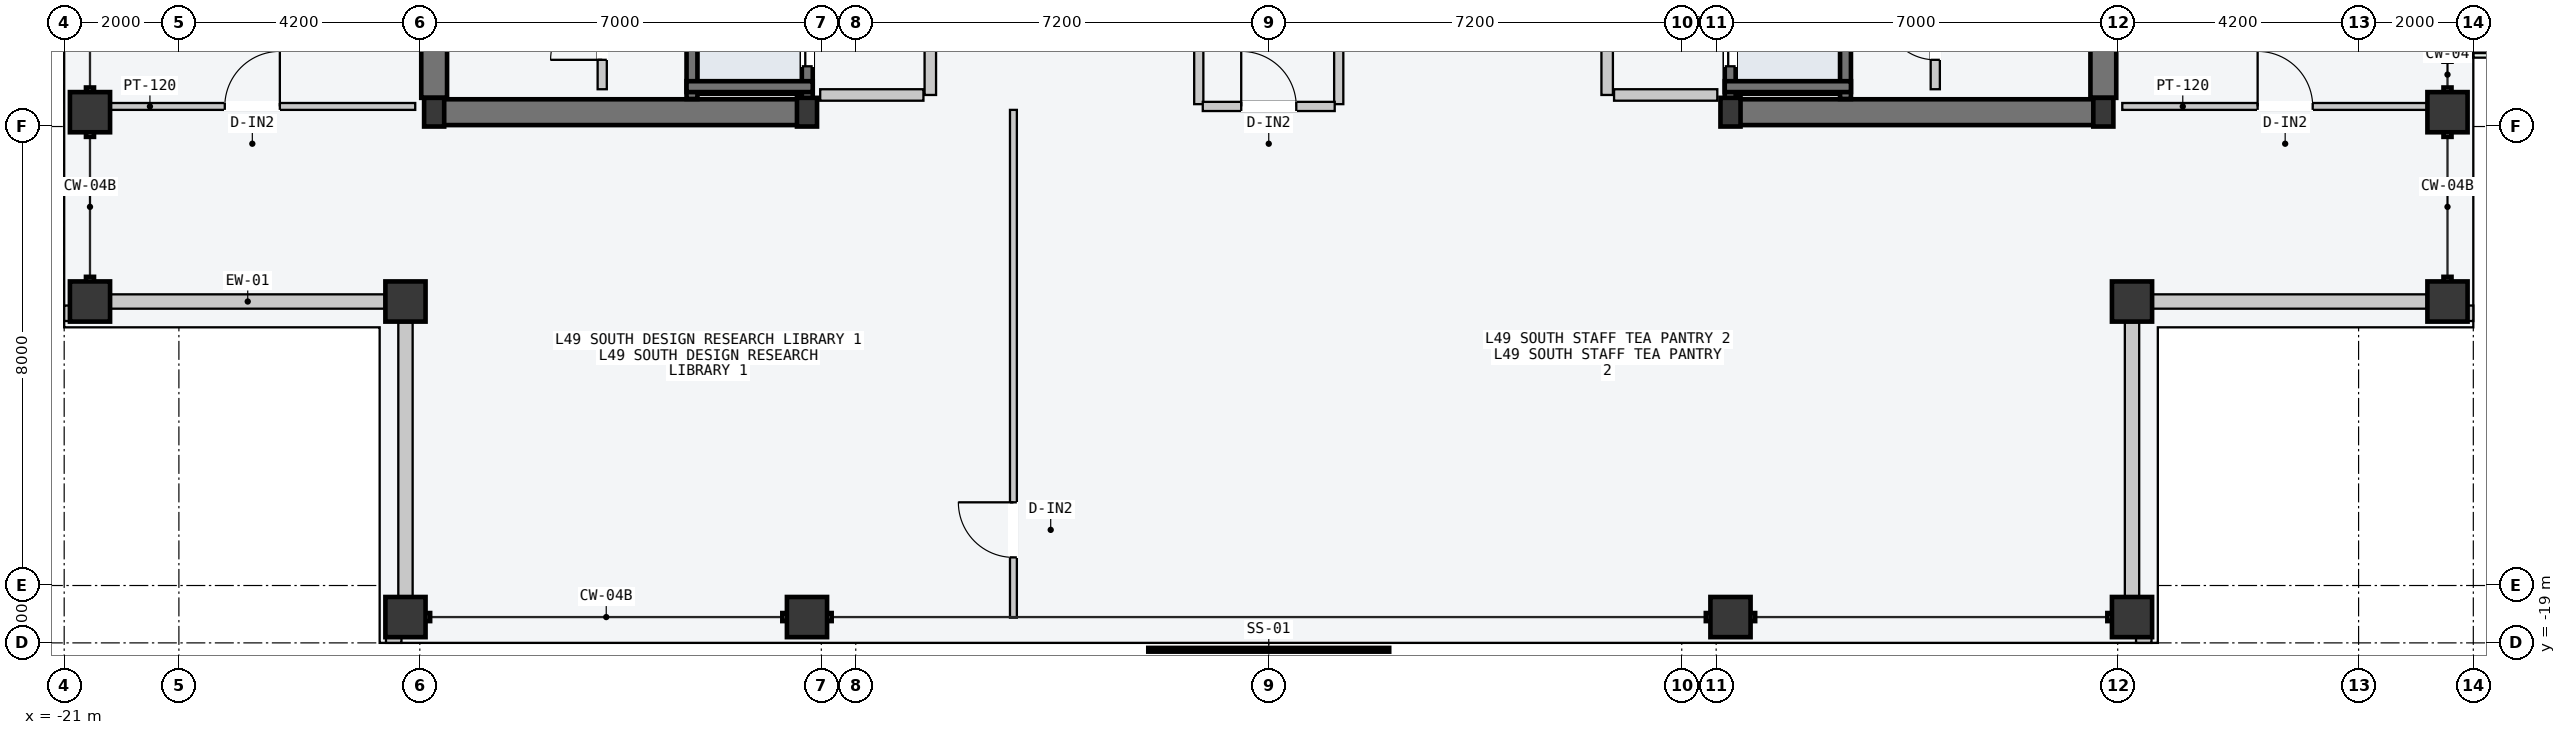
"""IFC4 building model, lengths in metres.
Left out: names, types, materials, properties, quantities, classifications, styles, units other than length and angle.
Written with IfcOpenShell. Run it as: python <this file> out.ifc"""

import sys

from ifc_helpers import new_model, si_unit, direction, frame, frame_2d, origin, origin_2d, place, context, subcontext, project, spatial, rectangle, hollow_rectangle, i_section, extrude, element, fill, save


model = new_model("IFC4")
c1 = context("Model", 3, precision=1e-05, world=origin(), true_north=direction((0.0, 1.0)))
c2 = subcontext(c1, "Body", "Model", "MODEL_VIEW")
j1 = project(units=[si_unit("LENGTHUNIT", "METRE"), si_unit("PLANEANGLEUNIT", "RADIAN")], contexts=[c1])
p1 = place(None, origin())
s1 = spatial("IfcSite", under=j1, at=p1, CompositionType="ELEMENT")
p2 = place(p1, origin())
s2 = spatial("IfcBuilding", under=s1, at=p2, CompositionType="ELEMENT")
p3 = place(p2, frame((0.0, 0.0, 187.5)))
s3 = spatial("IfcBuildingStorey", under=s2, at=p3, CompositionType="ELEMENT", Elevation=187.5)
p4 = place(p3, frame((-14.53, -9.75, -0.2), z_axis=(0.0, 0.0, 1.0), x_axis=(1.0, 0.0, 0.0)))
e1 = element("IfcWall", 1, at=p4, inside=s3, PredefinedType="SHEAR", context=c2, shape_type="SweptSolid", body=[
    extrude(rectangle(XDim=6.46, YDim=0.45, at=frame_2d((3.23, 0.0))), origin(), (0.0, 0.0, 1.0), 3.6),
])
p5 = place(p3, frame((-14.55, -9.5, -0.2), z_axis=(0.0, 0.0, 1.0), x_axis=(0.0, 1.0, 0.0)))
e2 = element("IfcWall", 2, at=p5, inside=s3, PredefinedType="SHEAR", context=c2, shape_type="SweptSolid", body=[
    extrude(rectangle(XDim=9.25, YDim=0.45, at=frame_2d((4.625, 0.0))), origin(), (0.0, 0.0, 1.0), 3.6),
])
p6 = place(p3, frame((8.07, -9.75, -0.2), z_axis=(0.0, 0.0, 1.0), x_axis=(1.0, 0.0, 0.0)))
e3 = element("IfcWall", 3, at=p6, inside=s3, PredefinedType="SHEAR", context=c2, shape_type="SweptSolid", body=[
    extrude(rectangle(XDim=6.46, YDim=0.45, at=frame_2d((3.23, 0.0))), origin(), (0.0, 0.0, 1.0), 3.6),
])
p7 = place(p3, frame((14.55, -9.5, -0.2), z_axis=(0.0, 0.0, 1.0), x_axis=(0.0, 1.0, 0.0)))
e4 = element("IfcWall", 4, at=p7, inside=s3, PredefinedType="SHEAR", context=c2, shape_type="SweptSolid", body=[
    extrude(rectangle(XDim=9.25, YDim=0.45, at=frame_2d((4.625, 0.0))), origin(), (0.0, 0.0, 1.0), 3.6),
])
for number, where, z_axis, x_axis in (
    (5, (-14.55, -9.75, 0.0), (0.0, 0.0, 1.0), (1.0, 0.0, 0.0)),
    (6, (-8.05, -9.75, 0.0), (0.0, 0.0, 1.0), (1.0, 0.0, 0.0)),
    (7, (8.05, -9.75, 0.0), (0.0, 0.0, 1.0), (1.0, 0.0, 0.0)),
    (8, (14.55, -9.75, 0.0), (0.0, 0.0, 1.0), (1.0, 0.0, 0.0)),
):
    element("IfcColumn", number, at=place(p3, frame(where, z_axis=z_axis, x_axis=x_axis)), inside=s3, PredefinedType="COLUMN", context=c2, shape_type="SweptSolid", body=[
        extrude(i_section(OverallWidth=0.35, OverallDepth=0.5, WebThickness=0.02, FlangeThickness=0.032, at=origin_2d()), origin(), (0.0, 0.0, 1.0), 3.6),
    ])
for number, where, z_axis, x_axis in (
    (9, (-15.05, -18.55, 0.0), (0.0, 0.0, 1.0), (1.0, 0.0, 0.0)),
    (10, (-8.05, -18.55, 0.0), (0.0, 0.0, 1.0), (1.0, 0.0, 0.0)),
    (11, (8.05, -18.55, 0.0), (0.0, 0.0, 1.0), (1.0, 0.0, 0.0)),
    (12, (15.05, -18.55, 0.0), (0.0, 0.0, 1.0), (1.0, 0.0, 0.0)),
    (13, (-20.55, -13.05, 0.0), (0.0, 0.0, 1.0), (0.0, 1.0, 0.0)),
    (14, (-20.55, -9.75, 0.0), (0.0, 0.0, 1.0), (0.0, 1.0, 0.0)),
    (15, (20.55, -13.05, 0.0), (0.0, 0.0, 1.0), (0.0, 1.0, 0.0)),
    (16, (20.55, -9.75, 0.0), (0.0, 0.0, 1.0), (0.0, 1.0, 0.0)),
    (17, (15.05, -13.05, 0.0), (0.0, 0.0, 1.0), (1.0, 0.0, 0.0)),
    (18, (-15.05, -13.05, 0.0), (0.0, 0.0, 1.0), (1.0, 0.0, 0.0)),
):
    element("IfcColumn", number, at=place(p3, frame(where, z_axis=z_axis, x_axis=x_axis)), inside=s3, PredefinedType="COLUMN", context=c2, shape_type="SweptSolid", body=[
        extrude(hollow_rectangle(XDim=0.7, YDim=0.7, WallThickness=0.03, at=origin_2d()), origin(), (0.0, 0.0, 1.0), 3.6),
    ])
p8 = place(p3, frame((20.86, -8.8, 0.0), z_axis=(0.0, 0.0, 1.0), x_axis=(0.0, 1.0, 0.0)))
e19 = element("IfcWall", 19, at=p8, inside=s3, PredefinedType="STANDARD", context=c2, shape_type="SweptSolid", body=[
    extrude(rectangle(XDim=10.8, YDim=0.25, at=frame_2d((5.4, 0.0))), origin(), (0.0, 0.0, 1.0), 3.4),
])
p9 = place(p8, frame((6.4, 0.0, 0.0)))
e20 = element("IfcOpeningElement", 20, at=p9, cuts=e19, PredefinedType="OPENING", context=c2, shape_type="SweptSolid", body=[
    extrude(rectangle(XDim=1.6, YDim=2.2, at=frame_2d((0.8, 1.1))), frame((0.0, 0.135, 0.0), z_axis=(0.0, -1.0, 0.0), x_axis=(1.0, 0.0, 0.0)), (0.0, 0.0, 1.0), 0.27),
])
p10 = place(p8, frame((2.0, 0.0, 0.85)))
e21 = element("IfcOpeningElement", 21, at=p10, cuts=e19, PredefinedType="OPENING", context=c2, shape_type="SweptSolid", body=[
    extrude(rectangle(XDim=2.0, YDim=2.1, at=frame_2d((1.0, 1.05))), frame((0.0, 0.135, 0.0), z_axis=(0.0, -1.0, 0.0), x_axis=(1.0, 0.0, 0.0)), (0.0, 0.0, 1.0), 0.27),
])
for number, where, z_axis, x_axis in (
    (22, (-20.19, -13.05, 0.0), (0.0, 0.0, 1.0), (1.0, 0.0, 0.0)),
    (23, (-15.05, -18.19, 0.0), (0.0, 0.0, 1.0), (0.0, 1.0, 0.0)),
    (24, (15.41, -13.05, 0.0), (0.0, 0.0, 1.0), (1.0, 0.0, 0.0)),
    (25, (15.05, -18.19, 0.0), (0.0, 0.0, 1.0), (0.0, 1.0, 0.0)),
):
    element("IfcWall", number, at=place(p3, frame(where, z_axis=z_axis, x_axis=x_axis)), inside=s3, PredefinedType="STANDARD", context=c2, shape_type="SweptSolid", body=[
        extrude(rectangle(XDim=4.78, YDim=0.25, at=frame_2d((2.39, 0.0))), origin(), (0.0, 0.0, 1.0), 2.75),
    ])
for number, where, z_axis, x_axis in (
    (26, (-15.39, -18.89, 0.0), (0.0, 0.0, 1.0), (1.0, 0.0, 0.0)),
    (27, (-20.89, -13.39, 0.0), (0.0, 0.0, 1.0), (0.0, 1.0, 0.0)),
    (28, (15.12, -18.89, 0.0), (0.0, 0.0, 1.0), (1.0, 0.0, 0.0)),
    (29, (20.89, -13.39, 0.0), (0.0, 0.0, 1.0), (0.0, 1.0, 0.0)),
):
    element("IfcWall", number, at=place(p3, frame(where, z_axis=z_axis, x_axis=x_axis)), inside=s3, PredefinedType="PARAPET", context=c2, shape_type="SweptSolid", body=[
        extrude(rectangle(XDim=0.27, YDim=0.22, at=frame_2d((0.135, 0.0))), origin(), (0.0, 0.0, 1.0), 1.2),
    ])
p11 = place(p3, frame((-8.045, -9.52, -0.2), z_axis=(0.0, 0.0, 1.0), x_axis=(0.0, 1.0, 0.0)))
e30 = element("IfcWall", 30, at=p11, inside=s3, PredefinedType="SOLIDWALL", context=c2, shape_type="SweptSolid", body=[
    extrude(rectangle(XDim=2.12, YDim=0.19, at=frame_2d((1.06, 0.0))), origin(), (0.0, 0.0, 1.0), 3.6),
])
p12 = place(p11, frame((0.57, 0.0, 0.2)))
e31 = element("IfcOpeningElement", 31, at=p12, cuts=e30, PredefinedType="OPENING", context=c2, shape_type="SweptSolid", body=[
    extrude(rectangle(XDim=1.1, YDim=2.2, at=frame_2d((0.55, 1.1))), frame((0.0, 0.105, 0.0), z_axis=(0.0, -1.0, 0.0), x_axis=(1.0, 0.0, 0.0)), (0.0, 0.0, 1.0), 0.21),
])
p13 = place(p3, frame((-10.055, -9.52, -0.2), z_axis=(0.0, 0.0, 1.0), x_axis=(0.0, 1.0, 0.0)))
e32 = element("IfcWall", 32, at=p13, inside=s3, PredefinedType="SOLIDWALL", context=c2, shape_type="SweptSolid", body=[
    extrude(rectangle(XDim=2.12, YDim=0.19, at=frame_2d((1.06, 0.0))), origin(), (0.0, 0.0, 1.0), 3.6),
])
p14 = place(p3, frame((-10.15, -9.305, -0.2), z_axis=(0.0, 0.0, 1.0), x_axis=(1.0, 0.0, 0.0)))
e33 = element("IfcWall", 33, at=p14, inside=s3, PredefinedType="SOLIDWALL", context=c2, shape_type="SweptSolid", body=[
    extrude(rectangle(XDim=2.2, YDim=0.19, at=frame_2d((1.1, 0.0))), origin(), (0.0, 0.0, 1.0), 3.6),
])
p15 = place(p3, frame((8.045, -9.52, -0.2), z_axis=(0.0, 0.0, 1.0), x_axis=(0.0, 1.0, 0.0)))
e34 = element("IfcWall", 34, at=p15, inside=s3, PredefinedType="SOLIDWALL", context=c2, shape_type="SweptSolid", body=[
    extrude(rectangle(XDim=2.12, YDim=0.19, at=frame_2d((1.06, 0.0))), origin(), (0.0, 0.0, 1.0), 3.6),
])
p16 = place(p15, frame((0.57, 0.0, 0.2)))
e35 = element("IfcOpeningElement", 35, at=p16, cuts=e34, PredefinedType="OPENING", context=c2, shape_type="SweptSolid", body=[
    extrude(rectangle(XDim=1.1, YDim=2.2, at=frame_2d((0.55, 1.1))), frame((0.0, 0.105, 0.0), z_axis=(0.0, -1.0, 0.0), x_axis=(1.0, 0.0, 0.0)), (0.0, 0.0, 1.0), 0.21),
])
p17 = place(p3, frame((10.055, -9.52, -0.2), z_axis=(0.0, 0.0, 1.0), x_axis=(0.0, 1.0, 0.0)))
e36 = element("IfcWall", 36, at=p17, inside=s3, PredefinedType="SOLIDWALL", context=c2, shape_type="SweptSolid", body=[
    extrude(rectangle(XDim=2.12, YDim=0.19, at=frame_2d((1.06, 0.0))), origin(), (0.0, 0.0, 1.0), 3.6),
])
p18 = place(p3, frame((7.95, -9.305, -0.2), z_axis=(0.0, 0.0, 1.0), x_axis=(1.0, 0.0, 0.0)))
e37 = element("IfcWall", 37, at=p18, inside=s3, PredefinedType="SOLIDWALL", context=c2, shape_type="SweptSolid", body=[
    extrude(rectangle(XDim=2.2, YDim=0.19, at=frame_2d((1.1, 0.0))), origin(), (0.0, 0.0, 1.0), 3.6),
])
p19 = place(p3, frame((-5.9, -9.45, 0.0), z_axis=(0.0, 0.0, 1.0), x_axis=(0.0, 1.0, 0.0)))
e38 = element("IfcWall", 38, at=p19, inside=s3, PredefinedType="PARTITIONING", context=c2, shape_type="SweptSolid", body=[
    extrude(rectangle(XDim=10.5, YDim=0.2, at=frame_2d((5.25, 0.0))), origin(), (0.0, 0.0, 1.0), 3.4),
])
p20 = place(p19, frame((3.9, 0.0, 0.0)))
e39 = element("IfcOpeningElement", 39, at=p20, cuts=e38, PredefinedType="OPENING", context=c2, shape_type="SweptSolid", body=[
    extrude(rectangle(XDim=1.5, YDim=2.2, at=frame_2d((0.75, 1.1))), frame((0.0, 0.11, 0.0), z_axis=(0.0, -1.0, 0.0), x_axis=(1.0, 0.0, 0.0)), (0.0, 0.0, 1.0), 0.22),
])
p21 = place(p3, frame((-6.02, -9.45, 0.0), z_axis=(0.0, 0.0, 1.0), x_axis=(-1.0, 0.0, 0.0)))
e40 = element("IfcWall", 40, at=p21, inside=s3, PredefinedType="PARTITIONING", context=c2, shape_type="SweptSolid", body=[
    extrude(rectangle(XDim=1.8, YDim=0.2, at=frame_2d((0.9, 0.0))), origin(), (0.0, 0.0, 1.0), 3.4),
])
p22 = place(p3, frame((-11.62, -9.35, 0.0), z_axis=(0.0, 0.0, 1.0), x_axis=(0.0, 1.0, 0.0)))
e41 = element("IfcWall", 41, at=p22, inside=s3, PredefinedType="PARTITIONING", context=c2, shape_type="SweptSolid", body=[
    extrude(rectangle(XDim=3.85, YDim=0.16, at=frame_2d((1.925, 0.0))), origin(), (0.0, 0.0, 1.0), 3.4),
])
p23 = place(p22, frame((0.512, 0.0, 0.0)))
e42 = element("IfcOpeningElement", 42, at=p23, cuts=e41, PredefinedType="OPENING", context=c2, shape_type="SweptSolid", body=[
    extrude(rectangle(XDim=0.9, YDim=2.15, at=frame_2d((0.45, 1.075))), frame((0.0, 0.09, 0.0), z_axis=(0.0, -1.0, 0.0), x_axis=(1.0, 0.0, 0.0)), (0.0, 0.0, 1.0), 0.18),
])
p24 = place(p22, frame((2.438, 0.0, 0.0)))
e43 = element("IfcOpeningElement", 43, at=p24, cuts=e41, PredefinedType="OPENING", context=c2, shape_type="SweptSolid", body=[
    extrude(rectangle(XDim=0.9, YDim=2.15, at=frame_2d((0.45, 1.075))), frame((0.0, 0.09, 0.0), z_axis=(0.0, -1.0, 0.0), x_axis=(1.0, 0.0, 0.0)), (0.0, 0.0, 1.0), 0.18),
])
p25 = place(p3, frame((5.9, -9.45, 0.0), z_axis=(0.0, 0.0, 1.0), x_axis=(0.0, 1.0, 0.0)))
e44 = element("IfcWall", 44, at=p25, inside=s3, PredefinedType="PARTITIONING", context=c2, shape_type="SweptSolid", body=[
    extrude(rectangle(XDim=10.5, YDim=0.2, at=frame_2d((5.25, 0.0))), origin(), (0.0, 0.0, 1.0), 3.4),
])
p26 = place(p25, frame((3.9, 0.0, 0.0)))
e45 = element("IfcOpeningElement", 45, at=p26, cuts=e44, PredefinedType="OPENING", context=c2, shape_type="SweptSolid", body=[
    extrude(rectangle(XDim=1.5, YDim=2.2, at=frame_2d((0.75, 1.1))), frame((0.0, 0.11, 0.0), z_axis=(0.0, -1.0, 0.0), x_axis=(1.0, 0.0, 0.0)), (0.0, 0.0, 1.0), 0.22),
])
p27 = place(p3, frame((6.02, -9.45, 0.0), z_axis=(0.0, 0.0, 1.0), x_axis=(1.0, 0.0, 0.0)))
e46 = element("IfcWall", 46, at=p27, inside=s3, PredefinedType="PARTITIONING", context=c2, shape_type="SweptSolid", body=[
    extrude(rectangle(XDim=1.8, YDim=0.2, at=frame_2d((0.9, 0.0))), origin(), (0.0, 0.0, 1.0), 3.4),
])
p28 = place(p3, frame((11.62, -9.35, 0.0), z_axis=(0.0, 0.0, 1.0), x_axis=(0.0, 1.0, 0.0)))
e47 = element("IfcWall", 47, at=p28, inside=s3, PredefinedType="PARTITIONING", context=c2, shape_type="SweptSolid", body=[
    extrude(rectangle(XDim=3.85, YDim=0.16, at=frame_2d((1.925, 0.0))), origin(), (0.0, 0.0, 1.0), 3.4),
])
p29 = place(p28, frame((0.512, 0.0, 0.0)))
e48 = element("IfcOpeningElement", 48, at=p29, cuts=e47, PredefinedType="OPENING", context=c2, shape_type="SweptSolid", body=[
    extrude(rectangle(XDim=0.9, YDim=2.15, at=frame_2d((0.45, 1.075))), frame((0.0, 0.09, 0.0), z_axis=(0.0, -1.0, 0.0), x_axis=(1.0, 0.0, 0.0)), (0.0, 0.0, 1.0), 0.18),
])
p30 = place(p28, frame((2.438, 0.0, 0.0)))
e49 = element("IfcOpeningElement", 49, at=p30, cuts=e47, PredefinedType="OPENING", context=c2, shape_type="SweptSolid", body=[
    extrude(rectangle(XDim=0.9, YDim=2.15, at=frame_2d((0.45, 1.075))), frame((0.0, 0.09, 0.0), z_axis=(0.0, -1.0, 0.0), x_axis=(1.0, 0.0, 0.0)), (0.0, 0.0, 1.0), 0.18),
])
p31 = place(p3, frame((-1.22, -9.61, 0.0), z_axis=(0.0, 0.0, 1.0), x_axis=(0.0, 1.0, 0.0)))
e50 = element("IfcWall", 50, at=p31, inside=s3, PredefinedType="PARTITIONING", context=c2, shape_type="SweptSolid", body=[
    extrude(rectangle(XDim=3.93, YDim=0.16, at=frame_2d((1.965, 0.0))), origin(), (0.0, 0.0, 1.0), 3.4),
])
p32 = place(p31, frame((1.15, 0.0, 0.0)))
e51 = element("IfcOpeningElement", 51, at=p32, cuts=e50, PredefinedType="OPENING", context=c2, shape_type="SweptSolid", body=[
    extrude(rectangle(XDim=0.96, YDim=2.18, at=frame_2d((0.48, 1.09))), frame((0.0, 0.09, 0.0), z_axis=(0.0, -1.0, 0.0), x_axis=(1.0, 0.0, 0.0)), (0.0, 0.0, 1.0), 0.18),
])
p33 = place(p3, frame((1.22, -9.61, 0.0), z_axis=(0.0, 0.0, 1.0), x_axis=(0.0, 1.0, 0.0)))
e52 = element("IfcWall", 52, at=p33, inside=s3, PredefinedType="PARTITIONING", context=c2, shape_type="SweptSolid", body=[
    extrude(rectangle(XDim=3.93, YDim=0.16, at=frame_2d((1.965, 0.0))), origin(), (0.0, 0.0, 1.0), 3.4),
])
p34 = place(p33, frame((1.15, 0.0, 0.0)))
e53 = element("IfcOpeningElement", 53, at=p34, cuts=e52, PredefinedType="OPENING", context=c2, shape_type="SweptSolid", body=[
    extrude(rectangle(XDim=0.96, YDim=2.18, at=frame_2d((0.48, 1.09))), frame((0.0, 0.09, 0.0), z_axis=(0.0, -1.0, 0.0), x_axis=(1.0, 0.0, 0.0)), (0.0, 0.0, 1.0), 0.18),
])
p35 = place(p3, frame((-4.451, -18.56, 0.0), z_axis=(0.0, 0.0, 1.0), x_axis=(0.0, 1.0, 0.0)))
e54 = element("IfcWall", 54, at=p35, inside=s3, PredefinedType="PARTITIONING", context=c2, shape_type="SweptSolid", body=[
    extrude(rectangle(XDim=8.85, YDim=0.12, at=frame_2d((4.425, 0.0))), origin(), (0.0, 0.0, 1.0), 3.4),
])
p36 = place(p35, frame((1.05, 0.0, 0.0)))
e55 = element("IfcOpeningElement", 55, at=p36, cuts=e54, PredefinedType="OPENING", context=c2, shape_type="SweptSolid", body=[
    extrude(rectangle(XDim=0.96, YDim=2.18, at=frame_2d((0.48, 1.09))), frame((0.0, 0.07, 0.0), z_axis=(0.0, -1.0, 0.0), x_axis=(1.0, 0.0, 0.0)), (0.0, 0.0, 1.0), 0.14),
])
p37 = place(p3, frame((-1.15, -9.65, 0.0), z_axis=(0.0, 0.0, 1.0), x_axis=(1.0, 0.0, 0.0)))
e56 = element("IfcWall", 56, at=p37, inside=s3, PredefinedType="PARTITIONING", context=c2, shape_type="SweptSolid", body=[
    extrude(rectangle(XDim=2.3, YDim=0.16, at=frame_2d((1.15, 0.0))), origin(), (0.0, 0.0, 1.0), 2.75),
])
p38 = place(p37, frame((0.67, 0.0, 0.0)))
e57 = element("IfcOpeningElement", 57, at=p38, cuts=e56, PredefinedType="OPENING", context=c2, shape_type="SweptSolid", body=[
    extrude(rectangle(XDim=0.96, YDim=2.18, at=frame_2d((0.48, 1.09))), frame((0.0, 0.09, 0.0), z_axis=(0.0, -1.0, 0.0), x_axis=(1.0, 0.0, 0.0)), (0.0, 0.0, 1.0), 0.18),
])
p39 = place(p3, frame((-20.56, -9.65, 0.0), z_axis=(0.0, 0.0, 1.0), x_axis=(1.0, 0.0, 0.0)))
e58 = element("IfcWall", 58, at=p39, inside=s3, PredefinedType="PARTITIONING", context=c2, shape_type="SweptSolid", body=[
    extrude(rectangle(XDim=5.68, YDim=0.12, at=frame_2d((2.84, 0.0))), origin(), (0.0, 0.0, 1.0), 2.75),
])
p40 = place(p39, frame((2.36, 0.0, 0.0)))
e59 = element("IfcOpeningElement", 59, at=p40, cuts=e58, PredefinedType="OPENING", context=c2, shape_type="SweptSolid", body=[
    extrude(rectangle(XDim=0.96, YDim=2.18, at=frame_2d((0.48, 1.09))), frame((0.0, 0.07, 0.0), z_axis=(0.0, -1.0, 0.0), x_axis=(1.0, 0.0, 0.0)), (0.0, 0.0, 1.0), 0.14),
])
p41 = place(p3, frame((14.88, -9.65, 0.0), z_axis=(0.0, 0.0, 1.0), x_axis=(1.0, 0.0, 0.0)))
e60 = element("IfcWall", 60, at=p41, inside=s3, PredefinedType="PARTITIONING", context=c2, shape_type="SweptSolid", body=[
    extrude(rectangle(XDim=5.68, YDim=0.12, at=frame_2d((2.84, 0.0))), origin(), (0.0, 0.0, 1.0), 2.75),
])
p42 = place(p41, frame((2.36, 0.0, 0.0)))
e61 = element("IfcOpeningElement", 61, at=p42, cuts=e60, PredefinedType="OPENING", context=c2, shape_type="SweptSolid", body=[
    extrude(rectangle(XDim=0.96, YDim=2.18, at=frame_2d((0.48, 1.09))), frame((0.0, 0.07, 0.0), z_axis=(0.0, -1.0, 0.0), x_axis=(1.0, 0.0, 0.0)), (0.0, 0.0, 1.0), 0.14),
])
p43 = place(p12, origin())
e62 = element("IfcDoor", 62, at=p43, inside=s3, OperationType="SLIDING_TO_LEFT", PredefinedType="DOOR", context=c2, shape_type="SweptSolid", body=[
    extrude(rectangle(XDim=1.1, YDim=2.2, at=frame_2d((0.55, 1.1))), frame((0.0, 0.025, 0.0), z_axis=(0.0, -1.0, 0.0), x_axis=(1.0, 0.0, 0.0)), (0.0, 0.0, 1.0), 0.05),
])
fill(e31, e62)
p44 = place(p16, origin())
e63 = element("IfcDoor", 63, at=p44, inside=s3, OperationType="SLIDING_TO_LEFT", PredefinedType="DOOR", context=c2, shape_type="SweptSolid", body=[
    extrude(rectangle(XDim=1.1, YDim=2.2, at=frame_2d((0.55, 1.1))), frame((0.0, 0.025, 0.0), z_axis=(0.0, -1.0, 0.0), x_axis=(1.0, 0.0, 0.0)), (0.0, 0.0, 1.0), 0.05),
])
fill(e35, e63)
p45 = place(p23, origin())
e64 = element("IfcDoor", 64, at=p45, inside=s3, OperationType="SINGLE_SWING_LEFT", PredefinedType="DOOR", context=c2, shape_type="SweptSolid", body=[
    extrude(rectangle(XDim=0.9, YDim=2.15, at=frame_2d((0.45, 1.075))), frame((0.0, 0.025, 0.0), z_axis=(0.0, -1.0, 0.0), x_axis=(1.0, 0.0, 0.0)), (0.0, 0.0, 1.0), 0.05),
])
fill(e42, e64)
p46 = place(p29, origin())
e65 = element("IfcDoor", 65, at=p46, inside=s3, OperationType="SINGLE_SWING_RIGHT", PredefinedType="DOOR", context=c2, shape_type="SweptSolid", body=[
    extrude(rectangle(XDim=0.9, YDim=2.15, at=frame_2d((0.45, 1.075))), frame((0.0, 0.025, 0.0), z_axis=(0.0, -1.0, 0.0), x_axis=(1.0, 0.0, 0.0)), (0.0, 0.0, 1.0), 0.05),
])
fill(e48, e65)
p47 = place(p36, origin())
e66 = element("IfcDoor", 66, at=p47, inside=s3, OperationType="SINGLE_SWING_RIGHT", PredefinedType="DOOR", context=c2, shape_type="SweptSolid", body=[
    extrude(rectangle(XDim=0.96, YDim=2.18, at=frame_2d((0.48, 1.09))), frame((0.0, 0.025, 0.0), z_axis=(0.0, -1.0, 0.0), x_axis=(1.0, 0.0, 0.0)), (0.0, 0.0, 1.0), 0.05),
])
fill(e55, e66)
p48 = place(p38, origin())
e67 = element("IfcDoor", 67, at=p48, inside=s3, OperationType="SINGLE_SWING_LEFT", PredefinedType="DOOR", context=c2, shape_type="SweptSolid", body=[
    extrude(rectangle(XDim=0.96, YDim=2.18, at=frame_2d((0.48, 1.09))), frame((0.0, 0.025, 0.0), z_axis=(0.0, -1.0, 0.0), x_axis=(1.0, 0.0, 0.0)), (0.0, 0.0, 1.0), 0.05),
])
fill(e57, e67)
p49 = place(p40, origin())
e68 = element("IfcDoor", 68, at=p49, inside=s3, OperationType="SINGLE_SWING_RIGHT", PredefinedType="DOOR", context=c2, shape_type="SweptSolid", body=[
    extrude(rectangle(XDim=0.96, YDim=2.18, at=frame_2d((0.48, 1.09))), frame((0.0, 0.025, 0.0), z_axis=(0.0, -1.0, 0.0), x_axis=(1.0, 0.0, 0.0)), (0.0, 0.0, 1.0), 0.05),
])
fill(e59, e68)
p50 = place(p42, origin())
e69 = element("IfcDoor", 69, at=p50, inside=s3, OperationType="SINGLE_SWING_LEFT", PredefinedType="DOOR", context=c2, shape_type="SweptSolid", body=[
    extrude(rectangle(XDim=0.96, YDim=2.18, at=frame_2d((0.48, 1.09))), frame((0.0, 0.025, 0.0), z_axis=(0.0, -1.0, 0.0), x_axis=(1.0, 0.0, 0.0)), (0.0, 0.0, 1.0), 0.05),
])
fill(e61, e69)
save(model, sys.argv[1])
